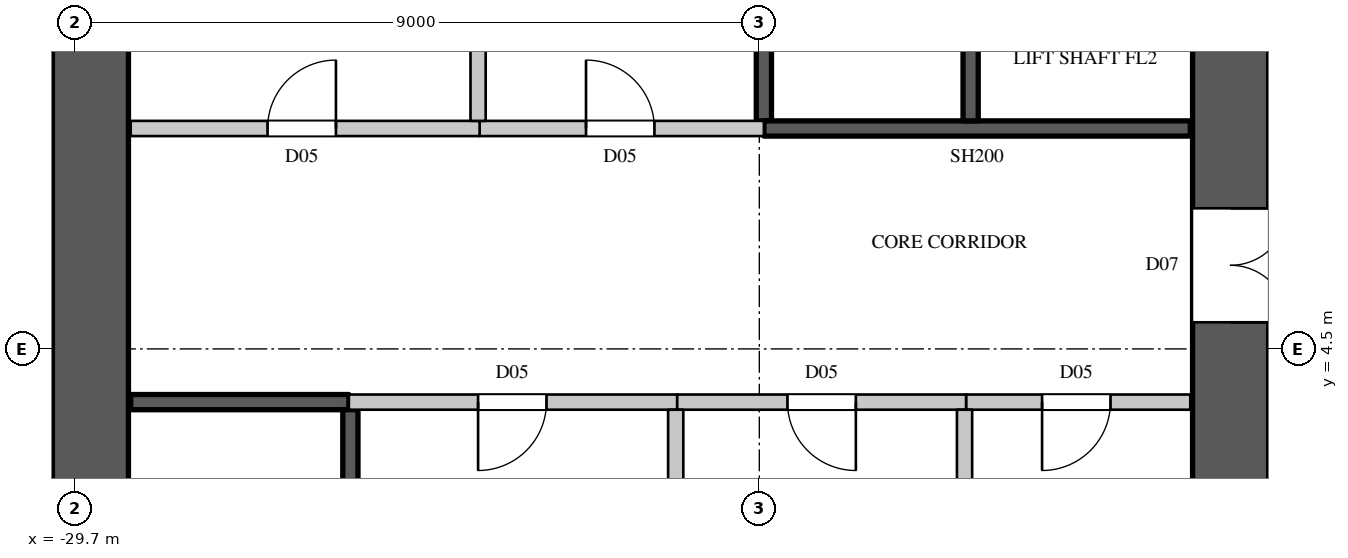
"""IFC4 building model, lengths in metres.
Left out: names, types, materials, properties, quantities, classifications, styles, units other than length and angle.
Written with IfcOpenShell. Run it as: python <this file> out.ifc"""

import sys

from ifc_helpers import new_model, si_unit, direction, frame, frame_2d, origin, place, context, subcontext, project, spatial, rectangle, extrude, element, fill, save


model = new_model("IFC4")
c1 = context("Model", 3, precision=1e-05, world=origin(), true_north=direction((0.0, 1.0)))
c2 = subcontext(c1, "Body", "Model", "MODEL_VIEW")
j1 = project(units=[si_unit("LENGTHUNIT", "METRE"), si_unit("PLANEANGLEUNIT", "RADIAN")], contexts=[c1])
p1 = place(None, origin())
s1 = spatial("IfcSite", under=j1, at=p1, CompositionType="ELEMENT")
p2 = place(p1, origin())
s2 = spatial("IfcBuilding", under=s1, at=p2, CompositionType="ELEMENT")
p3 = place(p2, frame((0.0, 0.0, 95.1)))
s3 = spatial("IfcBuildingStorey", under=s2, at=p3, CompositionType="ELEMENT", Elevation=95.1)
p4 = place(p3, frame((-14.5, -14.8, 0.0), z_axis=(0.0, 0.0, 1.0), x_axis=(0.0, 1.0, 0.0)))
e1 = element("IfcWall", 1, at=p4, inside=s3, PredefinedType="SHEAR", context=c2, shape_type="SweptSolid", body=[
    extrude(rectangle(XDim=29.6, YDim=1.0, at=frame_2d((14.8, 0.0))), origin(), (0.0, 0.0, 1.0), 3.6),
])
p5 = place(p4, frame((8.45, 0.0, 0.0)))
e2 = element("IfcOpeningElement", 2, at=p5, cuts=e1, PredefinedType="OPENING", context=c2, shape_type="SweptSolid", body=[
    extrude(rectangle(XDim=1.5, YDim=2.4, at=frame_2d((0.75, 1.2))), frame((0.0, 0.51, 0.0), z_axis=(0.0, -1.0, 0.0), x_axis=(1.0, 0.0, 0.0)), (0.0, 0.0, 1.0), 1.02),
])
p6 = place(p4, frame((19.65, 0.0, 0.0)))
e3 = element("IfcOpeningElement", 3, at=p6, cuts=e1, PredefinedType="OPENING", context=c2, shape_type="SweptSolid", body=[
    extrude(rectangle(XDim=1.5, YDim=2.4, at=frame_2d((0.75, 1.2))), frame((0.0, 0.51, 0.0), z_axis=(0.0, -1.0, 0.0), x_axis=(1.0, 0.0, 0.0)), (0.0, 0.0, 1.0), 1.02),
])
p7 = place(p4, frame((14.5, 0.0, 0.0)))
e4 = element("IfcOpeningElement", 4, at=p7, cuts=e1, PredefinedType="OPENING", context=c2, shape_type="SweptSolid", body=[
    extrude(rectangle(XDim=0.6, YDim=2.0, at=frame_2d((0.3, 1.0))), frame((0.0, 0.51, 0.0), z_axis=(0.0, -1.0, 0.0), x_axis=(1.0, 0.0, 0.0)), (0.0, 0.0, 1.0), 1.02),
])
p8 = place(p3, frame((-29.5, -10.2, 0.0), z_axis=(0.0, 0.0, 1.0), x_axis=(0.0, 1.0, 0.0)))
e5 = element("IfcWall", 5, at=p8, inside=s3, PredefinedType="SHEAR", context=c2, shape_type="SweptSolid", body=[
    extrude(rectangle(XDim=20.4, YDim=1.0, at=frame_2d((10.2, 0.0))), origin(), (0.0, 0.0, 1.0), 3.6),
])
p9 = place(p3, frame((-26.1, 3.8, 0.0), z_axis=(0.0, 0.0, 1.0), x_axis=(1.0, 0.0, 0.0)))
e6 = element("IfcWall", 6, at=p9, inside=s3, PredefinedType="PARTITIONING", context=c2, shape_type="SweptSolid", body=[
    extrude(rectangle(XDim=4.32, YDim=0.2, at=frame_2d((2.16, 0.0))), origin(), (0.0, 0.0, 1.0), 3.3),
])
p10 = place(p9, frame((1.7, 0.0, 0.0)))
e7 = element("IfcOpeningElement", 7, at=p10, cuts=e6, PredefinedType="OPENING", context=c2, shape_type="SweptSolid", body=[
    extrude(rectangle(XDim=0.9, YDim=2.2, at=frame_2d((0.45, 1.1))), frame((0.0, 0.11, 0.0), z_axis=(0.0, -1.0, 0.0), x_axis=(1.0, 0.0, 0.0)), (0.0, 0.0, 1.0), 0.22),
])
p11 = place(p3, frame((-24.38, 7.4, 0.0), z_axis=(0.0, 0.0, 1.0), x_axis=(1.0, 0.0, 0.0)))
e8 = element("IfcWall", 8, at=p11, inside=s3, PredefinedType="PARTITIONING", context=c2, shape_type="SweptSolid", body=[
    extrude(rectangle(XDim=3.74, YDim=0.2, at=frame_2d((1.87, 0.0))), origin(), (0.0, 0.0, 1.0), 3.3),
])
p12 = place(p11, frame((1.4, 0.0, 0.0)))
e9 = element("IfcOpeningElement", 9, at=p12, cuts=e8, PredefinedType="OPENING", context=c2, shape_type="SweptSolid", body=[
    extrude(rectangle(XDim=0.9, YDim=2.2, at=frame_2d((0.45, 1.1))), frame((0.0, 0.11, 0.0), z_axis=(0.0, -1.0, 0.0), x_axis=(1.0, 0.0, 0.0)), (0.0, 0.0, 1.0), 0.22),
])
p13 = place(p3, frame((-17.98, 3.8, 0.0), z_axis=(0.0, 0.0, 1.0), x_axis=(1.0, 0.0, 0.0)))
e10 = element("IfcWall", 10, at=p13, inside=s3, PredefinedType="PARTITIONING", context=c2, shape_type="SweptSolid", body=[
    extrude(rectangle(XDim=2.95, YDim=0.2, at=frame_2d((1.475, 0.0))), origin(), (0.0, 0.0, 1.0), 3.3),
])
p14 = place(p13, frame((1.0, 0.0, 0.0)))
e11 = element("IfcOpeningElement", 11, at=p14, cuts=e10, PredefinedType="OPENING", context=c2, shape_type="SweptSolid", body=[
    extrude(rectangle(XDim=0.9, YDim=2.2, at=frame_2d((0.45, 1.1))), frame((0.0, 0.11, 0.0), z_axis=(0.0, -1.0, 0.0), x_axis=(1.0, 0.0, 0.0)), (0.0, 0.0, 1.0), 0.22),
])
p15 = place(p3, frame((-28.97, 7.4, 0.0), z_axis=(0.0, 0.0, 1.0), x_axis=(1.0, 0.0, 0.0)))
e12 = element("IfcWall", 12, at=p15, inside=s3, PredefinedType="PARTITIONING", context=c2, shape_type="SweptSolid", body=[
    extrude(rectangle(XDim=4.59, YDim=0.2, at=frame_2d((2.295, 0.0))), origin(), (0.0, 0.0, 1.0), 3.3),
])
p16 = place(p15, frame((1.8, 0.0, 0.0)))
e13 = element("IfcOpeningElement", 13, at=p16, cuts=e12, PredefinedType="OPENING", context=c2, shape_type="SweptSolid", body=[
    extrude(rectangle(XDim=0.9, YDim=2.2, at=frame_2d((0.45, 1.1))), frame((0.0, 0.11, 0.0), z_axis=(0.0, -1.0, 0.0), x_axis=(1.0, 0.0, 0.0)), (0.0, 0.0, 1.0), 0.22),
])
p17 = place(p3, frame((-24.4, 7.5, 0.0), z_axis=(0.0, 0.0, 1.0), x_axis=(0.0, 1.0, 0.0)))
e14 = element("IfcWall", 14, at=p17, inside=s3, PredefinedType="PARTITIONING", context=c2, shape_type="SweptSolid", body=[
    extrude(rectangle(XDim=2.575, YDim=0.2, at=frame_2d((1.288, 0.0))), origin(), (0.0, 0.0, 1.0), 3.3),
])
p18 = place(p3, frame((-21.78, 3.8, 0.0), z_axis=(0.0, 0.0, 1.0), x_axis=(1.0, 0.0, 0.0)))
e15 = element("IfcWall", 15, at=p18, inside=s3, PredefinedType="PARTITIONING", context=c2, shape_type="SweptSolid", body=[
    extrude(rectangle(XDim=3.8, YDim=0.2, at=frame_2d((1.9, 0.0))), origin(), (0.0, 0.0, 1.0), 3.3),
])
p19 = place(p18, frame((1.45, 0.0, 0.0)))
e16 = element("IfcOpeningElement", 16, at=p19, cuts=e15, PredefinedType="OPENING", context=c2, shape_type="SweptSolid", body=[
    extrude(rectangle(XDim=0.9, YDim=2.2, at=frame_2d((0.45, 1.1))), frame((0.0, 0.11, 0.0), z_axis=(0.0, -1.0, 0.0), x_axis=(1.0, 0.0, 0.0)), (0.0, 0.0, 1.0), 0.22),
])
for number, where, z_axis, x_axis in (
    (17, (-21.8, 1.1, 0.0), (0.0, 0.0, 1.0), (0.0, 1.0, 0.0)),
    (18, (-18.0, 1.1, 0.0), (0.0, 0.0, 1.0), (0.0, 1.0, 0.0)),
):
    element("IfcWall", number, at=place(p3, frame(where, z_axis=z_axis, x_axis=x_axis)), inside=s3, PredefinedType="PARTITIONING", context=c2, shape_type="SweptSolid", body=[
        extrude(rectangle(XDim=2.6, YDim=0.2, at=frame_2d((1.3, 0.0))), origin(), (0.0, 0.0, 1.0), 3.3),
    ])
p20 = place(p3, frame((-28.97, 3.8, 0.0), z_axis=(0.0, 0.0, 1.0), x_axis=(1.0, 0.0, 0.0)))
e19 = element("IfcWall", 19, at=p20, inside=s3, PredefinedType="SHEAR", context=c2, shape_type="SweptSolid", body=[
    extrude(rectangle(XDim=2.87, YDim=0.2, at=frame_2d((1.435, 0.0))), origin(), (0.0, 0.0, 1.0), 3.3),
])
p21 = place(p3, frame((-26.08, 1.1, 0.0), z_axis=(0.0, 0.0, 1.0), x_axis=(0.0, 1.0, 0.0)))
e20 = element("IfcWall", 20, at=p21, inside=s3, PredefinedType="SHEAR", context=c2, shape_type="SweptSolid", body=[
    extrude(rectangle(XDim=2.6, YDim=0.2, at=frame_2d((1.3, 0.0))), origin(), (0.0, 0.0, 1.0), 3.3),
])
p22 = place(p3, frame((-20.64, 7.5, 0.0), z_axis=(0.0, 0.0, 1.0), x_axis=(0.0, 1.0, 0.0)))
e21 = element("IfcWall", 21, at=p22, inside=s3, PredefinedType="SHEAR", context=c2, shape_type="SweptSolid", body=[
    extrude(rectangle(XDim=2.575, YDim=0.2, at=frame_2d((1.288, 0.0))), origin(), (0.0, 0.0, 1.0), 3.3),
])
p23 = place(p3, frame((-20.64, 7.4, 0.0), z_axis=(0.0, 0.0, 1.0), x_axis=(1.0, 0.0, 0.0)))
e22 = element("IfcWall", 22, at=p23, inside=s3, PredefinedType="SHEAR", context=c2, shape_type="SweptSolid", body=[
    extrude(rectangle(XDim=5.61, YDim=0.2, at=frame_2d((2.805, 0.0))), origin(), (0.0, 0.0, 1.0), 3.3),
])
p24 = place(p3, frame((-17.92, 7.5, 0.0), z_axis=(0.0, 0.0, 1.0), x_axis=(0.0, 1.0, 0.0)))
e23 = element("IfcWall", 23, at=p24, inside=s3, PredefinedType="SHEAR", context=c2, shape_type="SweptSolid", body=[
    extrude(rectangle(XDim=2.6, YDim=0.2, at=frame_2d((1.3, 0.0))), origin(), (0.0, 0.0, 1.0), 3.6),
])
p25 = place(p10, origin())
e24 = element("IfcDoor", 24, at=p25, inside=s3, OperationType="SINGLE_SWING_RIGHT", PredefinedType="DOOR", context=c2, shape_type="SweptSolid", body=[
    extrude(rectangle(XDim=0.9, YDim=2.2, at=frame_2d((0.45, 1.1))), frame((0.0, 0.025, 0.0), z_axis=(0.0, -1.0, 0.0), x_axis=(1.0, 0.0, 0.0)), (0.0, 0.0, 1.0), 0.05),
])
fill(e7, e24)
p26 = place(p19, origin())
e25 = element("IfcDoor", 25, at=p26, inside=s3, OperationType="SINGLE_SWING_LEFT", PredefinedType="DOOR", context=c2, shape_type="SweptSolid", body=[
    extrude(rectangle(XDim=0.9, YDim=2.2, at=frame_2d((0.45, 1.1))), frame((0.0, 0.025, 0.0), z_axis=(0.0, -1.0, 0.0), x_axis=(1.0, 0.0, 0.0)), (0.0, 0.0, 1.0), 0.05),
])
fill(e16, e25)
p27 = place(p14, origin())
e26 = element("IfcDoor", 26, at=p27, inside=s3, OperationType="SINGLE_SWING_RIGHT", PredefinedType="DOOR", context=c2, shape_type="SweptSolid", body=[
    extrude(rectangle(XDim=0.9, YDim=2.2, at=frame_2d((0.45, 1.1))), frame((0.0, 0.025, 0.0), z_axis=(0.0, -1.0, 0.0), x_axis=(1.0, 0.0, 0.0)), (0.0, 0.0, 1.0), 0.05),
])
fill(e11, e26)
p28 = place(p16, origin())
e27 = element("IfcDoor", 27, at=p28, inside=s3, OperationType="SINGLE_SWING_RIGHT", PredefinedType="DOOR", context=c2, shape_type="SweptSolid", body=[
    extrude(rectangle(XDim=0.9, YDim=2.2, at=frame_2d((0.45, 1.1))), frame((0.0, 0.025, 0.0), z_axis=(0.0, -1.0, 0.0), x_axis=(1.0, 0.0, 0.0)), (0.0, 0.0, 1.0), 0.05),
])
fill(e13, e27)
p29 = place(p12, origin())
e28 = element("IfcDoor", 28, at=p29, inside=s3, OperationType="SINGLE_SWING_LEFT", PredefinedType="DOOR", context=c2, shape_type="SweptSolid", body=[
    extrude(rectangle(XDim=0.9, YDim=2.2, at=frame_2d((0.45, 1.1))), frame((0.0, 0.025, 0.0), z_axis=(0.0, -1.0, 0.0), x_axis=(1.0, 0.0, 0.0)), (0.0, 0.0, 1.0), 0.05),
])
fill(e9, e28)
p30 = place(p6, origin())
e29 = element("IfcDoor", 29, at=p30, inside=s3, OperationType="DOUBLE_DOOR_SINGLE_SWING", PredefinedType="DOOR", context=c2, shape_type="SweptSolid", body=[
    extrude(rectangle(XDim=1.5, YDim=2.4, at=frame_2d((0.75, 1.2))), frame((0.0, -0.445, 0.0), z_axis=(0.0, -1.0, 0.0), x_axis=(1.0, 0.0, 0.0)), (0.0, 0.0, 1.0), 0.05),
])
fill(e3, e29)
save(model, sys.argv[1])
